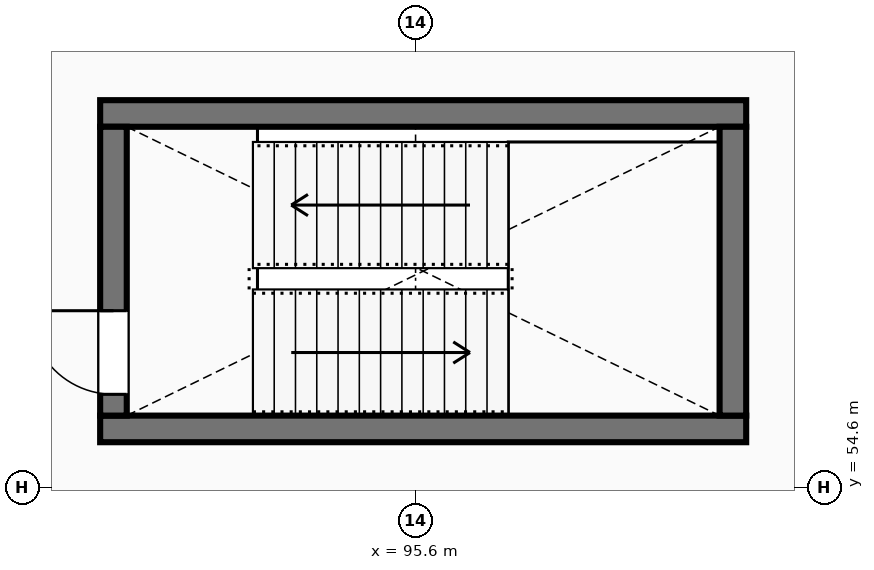
"""IFC4 building model, lengths in metres.
Left out: names, types, materials, properties, quantities, classifications, styles, units other than length and angle.
Written with IfcOpenShell. Run it as: python <this file> out.ifc"""

import sys

from ifc_helpers import new_model, si_unit, direction, frame, frame_2d, origin, place, context, subcontext, project, spatial, rectangle, extrude, element, fill, save


model = new_model("IFC4")
c1 = context("Model", 3, precision=1e-05, world=origin(), true_north=direction((0.0, 1.0)))
c2 = subcontext(c1, "Body", "Model", "MODEL_VIEW")
j1 = project(units=[si_unit("LENGTHUNIT", "METRE"), si_unit("PLANEANGLEUNIT", "RADIAN")], contexts=[c1])
p1 = place(None, origin())
s1 = spatial("IfcSite", under=j1, at=p1, CompositionType="ELEMENT")
p2 = place(p1, origin())
s2 = spatial("IfcBuilding", under=s1, at=p2, CompositionType="ELEMENT")
p3 = place(p2, frame((0.0, 0.0, 15.0)))
s3 = spatial("IfcBuildingStorey", under=s2, at=p3, CompositionType="ELEMENT", Elevation=15.0)
for number, where, z_axis, x_axis in (
    (1, (91.45, 55.375, 0.0), (0.0, 0.0, 1.0), (1.0, 0.0, 0.0)),
    (2, (99.95, 59.525, 0.0), (0.0, 0.0, 1.0), (-1.0, 0.0, 0.0)),
):
    element("IfcWall", number, at=place(p3, frame(where, z_axis=z_axis, x_axis=x_axis)), inside=s3, PredefinedType="SHEAR", context=c2, shape_type="SweptSolid", body=[
        extrude(rectangle(XDim=8.5, YDim=0.35, at=frame_2d((4.25, 0.0))), origin(), (0.0, 0.0, 1.0), 4.22),
    ])
p4 = place(p3, frame((91.625, 55.55, 0.0), z_axis=(0.0, 0.0, 1.0), x_axis=(0.0, 1.0, 0.0)))
e3 = element("IfcWall", 3, at=p4, inside=s3, PredefinedType="SHEAR", context=c2, shape_type="SweptSolid", body=[
    extrude(rectangle(XDim=3.8, YDim=0.35, at=frame_2d((1.9, 0.0))), origin(), (0.0, 0.0, 1.0), 4.22),
])
p5 = place(p4, frame((0.28, 0.0, 0.0)))
e4 = element("IfcOpeningElement", 4, at=p5, cuts=e3, PredefinedType="OPENING", context=c2, shape_type="SweptSolid", body=[
    extrude(rectangle(XDim=1.1, YDim=2.08, at=frame_2d((0.55, 1.04))), frame((0.0, 0.185, 0.0), z_axis=(0.0, -1.0, 0.0), x_axis=(1.0, 0.0, 0.0)), (0.0, 0.0, 1.0), 0.37),
])
p6 = place(p3, frame((99.775, 59.35, 0.0), z_axis=(0.0, 0.0, 1.0), x_axis=(0.0, -1.0, 0.0)))
e5 = element("IfcWall", 5, at=p6, inside=s3, PredefinedType="SHEAR", context=c2, shape_type="SweptSolid", body=[
    extrude(rectangle(XDim=3.8, YDim=0.35, at=frame_2d((1.9, 0.0))), origin(), (0.0, 0.0, 1.0), 4.22),
])
p7 = place(p5, origin())
e6 = element("IfcDoor", 6, at=p7, inside=s3, OperationType="SINGLE_SWING_RIGHT", PredefinedType="DOOR", context=c2, shape_type="SweptSolid", body=[
    extrude(rectangle(XDim=1.1, YDim=2.08, at=frame_2d((0.55, 1.04))), frame((0.0, 0.025, 0.0), z_axis=(0.0, -1.0, 0.0), x_axis=(1.0, 0.0, 0.0)), (0.0, 0.0, 1.0), 0.05),
])
fill(e4, e6)
save(model, sys.argv[1])
